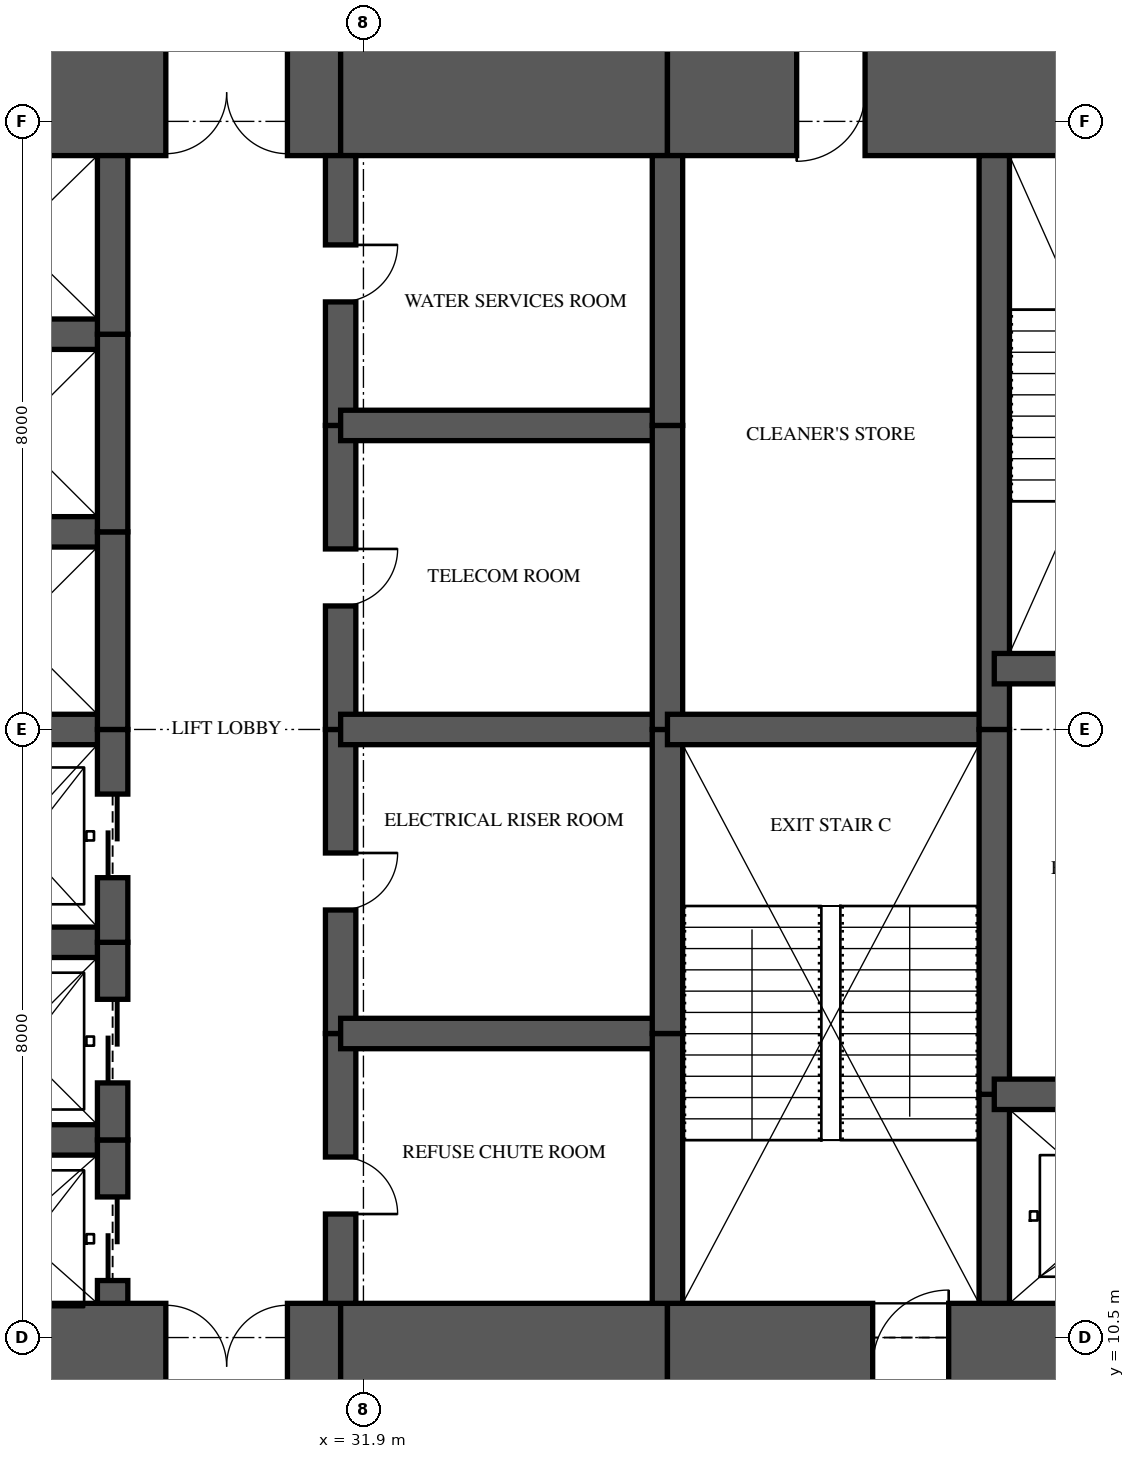
"""IFC4 building model, lengths in metres.
Left out: names, types, materials, properties, quantities, classifications, styles, units other than length and angle.
Written with IfcOpenShell. Run it as: python <this file> out.ifc"""

import sys

from ifc_helpers import new_model, si_unit, direction, frame, frame_2d, origin, place, context, subcontext, project, spatial, rectangle, extrude, element, fill, save


model = new_model("IFC4")
c1 = context("Model", 3, precision=1e-05, world=origin(), true_north=direction((0.0, 1.0)))
c2 = subcontext(c1, "Body", "Model", "MODEL_VIEW")
j1 = project(units=[si_unit("LENGTHUNIT", "METRE"), si_unit("PLANEANGLEUNIT", "RADIAN")], contexts=[c1])
p1 = place(None, origin())
s1 = spatial("IfcSite", under=j1, at=p1, CompositionType="ELEMENT")
p2 = place(p1, origin())
s2 = spatial("IfcBuilding", under=s1, at=p2, CompositionType="ELEMENT")
p3 = place(p2, frame((0.0, 0.0, 41.1)))
s3 = spatial("IfcBuildingStorey", under=s2, at=p3, CompositionType="ELEMENT", Elevation=41.1)
p4 = place(p3, frame((26.0, 10.125, 0.0), z_axis=(0.0, 0.0, 1.0), x_axis=(1.0, 0.0, 0.0)))
e1 = element("IfcWall", 1, at=p4, inside=s3, PredefinedType="SHEAR", context=c2, shape_type="SweptSolid", body=[
    extrude(rectangle(XDim=5.6, YDim=1.65, at=frame_2d((2.8, 0.0))), origin(), (0.0, 0.0, 1.0), 3.35),
])
p5 = place(p4, frame((3.3, 0.0, 0.0)))
e2 = element("IfcOpeningElement", 2, at=p5, cuts=e1, PredefinedType="OPENING", context=c2, shape_type="SweptSolid", body=[
    extrude(rectangle(XDim=1.6, YDim=2.1, at=frame_2d((0.8, 1.05))), frame((0.0, 0.835, 0.0), z_axis=(0.0, -1.0, 0.0), x_axis=(1.0, 0.0, 0.0)), (0.0, 0.0, 1.0), 1.67),
])
p6 = place(p3, frame((31.6, 10.125, 0.0), z_axis=(0.0, 0.0, 1.0), x_axis=(1.0, 0.0, 0.0)))
e3 = element("IfcWall", 3, at=p6, inside=s3, PredefinedType="SHEAR", context=c2, shape_type="SweptSolid", body=[
    extrude(rectangle(XDim=4.3, YDim=1.65, at=frame_2d((2.15, 0.0))), origin(), (0.0, 0.0, 1.0), 3.35),
])
p7 = place(p3, frame((35.9, 10.125, 0.0), z_axis=(0.0, 0.0, 1.0), x_axis=(1.0, 0.0, 0.0)))
e4 = element("IfcWall", 4, at=p7, inside=s3, PredefinedType="SHEAR", context=c2, shape_type="SweptSolid", body=[
    extrude(rectangle(XDim=8.375, YDim=1.65, at=frame_2d((4.188, 0.0))), origin(), (0.0, 0.0, 1.0), 3.35),
])
p8 = place(p7, frame((2.7, 0.0, 0.0)))
e5 = element("IfcOpeningElement", 5, at=p8, cuts=e4, PredefinedType="OPENING", context=c2, shape_type="SweptSolid", body=[
    extrude(rectangle(XDim=1.0, YDim=2.1, at=frame_2d((0.5, 1.05))), frame((0.0, 0.835, 0.0), z_axis=(0.0, -1.0, 0.0), x_axis=(1.0, 0.0, 0.0)), (0.0, 0.0, 1.0), 1.67),
])
p9 = place(p3, frame((44.275, 26.875, 0.0), z_axis=(0.0, 0.0, 1.0), x_axis=(-1.0, 0.0, 0.0)))
e6 = element("IfcWall", 6, at=p9, inside=s3, PredefinedType="SHEAR", context=c2, shape_type="SweptSolid", body=[
    extrude(rectangle(XDim=8.375, YDim=1.65, at=frame_2d((4.188, 0.0))), origin(), (0.0, 0.0, 1.0), 3.35),
])
p10 = place(p9, frame((5.775, 0.0, 0.0)))
e7 = element("IfcOpeningElement", 7, at=p10, cuts=e6, PredefinedType="OPENING", context=c2, shape_type="SweptSolid", body=[
    extrude(rectangle(XDim=0.9, YDim=2.1, at=frame_2d((0.45, 1.05))), frame((0.0, 0.835, 0.0), z_axis=(0.0, -1.0, 0.0), x_axis=(1.0, 0.0, 0.0)), (0.0, 0.0, 1.0), 1.67),
])
p11 = place(p3, frame((35.9, 26.875, 0.0), z_axis=(0.0, 0.0, 1.0), x_axis=(-1.0, 0.0, 0.0)))
e8 = element("IfcWall", 8, at=p11, inside=s3, PredefinedType="SHEAR", context=c2, shape_type="SweptSolid", body=[
    extrude(rectangle(XDim=4.3, YDim=1.65, at=frame_2d((2.15, 0.0))), origin(), (0.0, 0.0, 1.0), 3.35),
])
p12 = place(p3, frame((31.6, 26.875, 0.0), z_axis=(0.0, 0.0, 1.0), x_axis=(-1.0, 0.0, 0.0)))
e9 = element("IfcWall", 9, at=p12, inside=s3, PredefinedType="SHEAR", context=c2, shape_type="SweptSolid", body=[
    extrude(rectangle(XDim=5.6, YDim=1.65, at=frame_2d((2.8, 0.0))), origin(), (0.0, 0.0, 1.0), 3.35),
])
p13 = place(p12, frame((0.7, 0.0, 0.0)))
e10 = element("IfcOpeningElement", 10, at=p13, cuts=e9, PredefinedType="OPENING", context=c2, shape_type="SweptSolid", body=[
    extrude(rectangle(XDim=1.6, YDim=2.1, at=frame_2d((0.8, 1.05))), frame((0.0, 0.835, 0.0), z_axis=(0.0, -1.0, 0.0), x_axis=(1.0, 0.0, 0.0)), (0.0, 0.0, 1.0), 1.67),
])
p14 = place(p3, frame((28.6, 10.95, 0.0), z_axis=(0.0, 0.0, 1.0), x_axis=(0.0, 1.0, 0.0)))
e11 = element("IfcWall", 11, at=p14, inside=s3, PredefinedType="SHEAR", context=c2, shape_type="SweptSolid", body=[
    extrude(rectangle(XDim=2.15, YDim=0.4, at=frame_2d((1.075, 0.0))), origin(), (0.0, 0.0, 1.0), 3.35),
])
p15 = place(p14, frame((0.3, 0.0, 0.0)))
e12 = element("IfcOpeningElement", 12, at=p15, cuts=e11, PredefinedType="OPENING", context=c2, shape_type="SweptSolid", body=[
    extrude(rectangle(XDim=1.1, YDim=2.1, at=frame_2d((0.55, 1.05))), frame((0.0, 0.21, 0.0), z_axis=(0.0, -1.0, 0.0), x_axis=(1.0, 0.0, 0.0)), (0.0, 0.0, 1.0), 0.42),
])
p16 = place(p3, frame((28.6, 13.1, 0.0), z_axis=(0.0, 0.0, 1.0), x_axis=(0.0, 1.0, 0.0)))
e13 = element("IfcWall", 13, at=p16, inside=s3, PredefinedType="SHEAR", context=c2, shape_type="SweptSolid", body=[
    extrude(rectangle(XDim=2.6, YDim=0.4, at=frame_2d((1.3, 0.0))), origin(), (0.0, 0.0, 1.0), 3.35),
])
p17 = place(p16, frame((0.75, 0.0, 0.0)))
e14 = element("IfcOpeningElement", 14, at=p17, cuts=e13, PredefinedType="OPENING", context=c2, shape_type="SweptSolid", body=[
    extrude(rectangle(XDim=1.1, YDim=2.1, at=frame_2d((0.55, 1.05))), frame((0.0, 0.21, 0.0), z_axis=(0.0, -1.0, 0.0), x_axis=(1.0, 0.0, 0.0)), (0.0, 0.0, 1.0), 0.42),
])
p18 = place(p3, frame((28.6, 15.7, 0.0), z_axis=(0.0, 0.0, 1.0), x_axis=(0.0, 1.0, 0.0)))
e15 = element("IfcWall", 15, at=p18, inside=s3, PredefinedType="SHEAR", context=c2, shape_type="SweptSolid", body=[
    extrude(rectangle(XDim=2.8, YDim=0.4, at=frame_2d((1.4, 0.0))), origin(), (0.0, 0.0, 1.0), 3.35),
])
p19 = place(p18, frame((0.85, 0.0, 0.0)))
e16 = element("IfcOpeningElement", 16, at=p19, cuts=e15, PredefinedType="OPENING", context=c2, shape_type="SweptSolid", body=[
    extrude(rectangle(XDim=1.1, YDim=2.1, at=frame_2d((0.55, 1.05))), frame((0.0, 0.21, 0.0), z_axis=(0.0, -1.0, 0.0), x_axis=(1.0, 0.0, 0.0)), (0.0, 0.0, 1.0), 0.42),
])
p20 = place(p3, frame((28.6, 18.5, 0.0), z_axis=(0.0, 0.0, 1.0), x_axis=(0.0, 1.0, 0.0)))
e17 = element("IfcWall", 17, at=p20, inside=s3, PredefinedType="SHEAR", context=c2, shape_type="SweptSolid", body=[
    extrude(rectangle(XDim=2.6, YDim=0.4, at=frame_2d((1.3, 0.0))), origin(), (0.0, 0.0, 1.0), 3.35),
])
p21 = place(p3, frame((28.6, 21.1, 0.0), z_axis=(0.0, 0.0, 1.0), x_axis=(0.0, 1.0, 0.0)))
e18 = element("IfcWall", 18, at=p21, inside=s3, PredefinedType="SHEAR", context=c2, shape_type="SweptSolid", body=[
    extrude(rectangle(XDim=2.6, YDim=0.4, at=frame_2d((1.3, 0.0))), origin(), (0.0, 0.0, 1.0), 3.35),
])
p22 = place(p3, frame((28.6, 23.7, 0.0), z_axis=(0.0, 0.0, 1.0), x_axis=(0.0, 1.0, 0.0)))
e19 = element("IfcWall", 19, at=p22, inside=s3, PredefinedType="SHEAR", context=c2, shape_type="SweptSolid", body=[
    extrude(rectangle(XDim=2.35, YDim=0.4, at=frame_2d((1.175, 0.0))), origin(), (0.0, 0.0, 1.0), 3.35),
])
p23 = place(p3, frame((31.6, 10.95, 0.0), z_axis=(0.0, 0.0, 1.0), x_axis=(0.0, 1.0, 0.0)))
e20 = element("IfcWall", 20, at=p23, inside=s3, PredefinedType="SHEAR", context=c2, shape_type="SweptSolid", body=[
    extrude(rectangle(XDim=3.55, YDim=0.4, at=frame_2d((1.775, 0.0))), origin(), (0.0, 0.0, 1.0), 3.35),
])
p24 = place(p23, frame((1.175, 0.0, 0.0)))
e21 = element("IfcOpeningElement", 21, at=p24, cuts=e20, PredefinedType="OPENING", context=c2, shape_type="SweptSolid", body=[
    extrude(rectangle(XDim=0.75, YDim=2.1, at=frame_2d((0.375, 1.05))), frame((0.0, 0.21, 0.0), z_axis=(0.0, -1.0, 0.0), x_axis=(1.0, 0.0, 0.0)), (0.0, 0.0, 1.0), 0.42),
])
p25 = place(p3, frame((31.6, 14.5, 0.0), z_axis=(0.0, 0.0, 1.0), x_axis=(0.0, 1.0, 0.0)))
e22 = element("IfcWall", 22, at=p25, inside=s3, PredefinedType="SHEAR", context=c2, shape_type="SweptSolid", body=[
    extrude(rectangle(XDim=4.0, YDim=0.4, at=frame_2d((2.0, 0.0))), origin(), (0.0, 0.0, 1.0), 3.35),
])
p26 = place(p25, frame((1.625, 0.0, 0.0)))
e23 = element("IfcOpeningElement", 23, at=p26, cuts=e22, PredefinedType="OPENING", context=c2, shape_type="SweptSolid", body=[
    extrude(rectangle(XDim=0.75, YDim=2.1, at=frame_2d((0.375, 1.05))), frame((0.0, 0.21, 0.0), z_axis=(0.0, -1.0, 0.0), x_axis=(1.0, 0.0, 0.0)), (0.0, 0.0, 1.0), 0.42),
])
p27 = place(p3, frame((31.6, 18.5, 0.0), z_axis=(0.0, 0.0, 1.0), x_axis=(0.0, 1.0, 0.0)))
e24 = element("IfcWall", 24, at=p27, inside=s3, PredefinedType="SHEAR", context=c2, shape_type="SweptSolid", body=[
    extrude(rectangle(XDim=4.0, YDim=0.4, at=frame_2d((2.0, 0.0))), origin(), (0.0, 0.0, 1.0), 3.35),
])
p28 = place(p27, frame((1.625, 0.0, 0.0)))
e25 = element("IfcOpeningElement", 25, at=p28, cuts=e24, PredefinedType="OPENING", context=c2, shape_type="SweptSolid", body=[
    extrude(rectangle(XDim=0.75, YDim=2.1, at=frame_2d((0.375, 1.05))), frame((0.0, 0.21, 0.0), z_axis=(0.0, -1.0, 0.0), x_axis=(1.0, 0.0, 0.0)), (0.0, 0.0, 1.0), 0.42),
])
p29 = place(p3, frame((31.6, 22.5, 0.0), z_axis=(0.0, 0.0, 1.0), x_axis=(0.0, 1.0, 0.0)))
e26 = element("IfcWall", 26, at=p29, inside=s3, PredefinedType="SHEAR", context=c2, shape_type="SweptSolid", body=[
    extrude(rectangle(XDim=3.55, YDim=0.4, at=frame_2d((1.775, 0.0))), origin(), (0.0, 0.0, 1.0), 3.35),
])
p30 = place(p29, frame((1.625, 0.0, 0.0)))
e27 = element("IfcOpeningElement", 27, at=p30, cuts=e26, PredefinedType="OPENING", context=c2, shape_type="SweptSolid", body=[
    extrude(rectangle(XDim=0.75, YDim=2.1, at=frame_2d((0.375, 1.05))), frame((0.0, 0.21, 0.0), z_axis=(0.0, -1.0, 0.0), x_axis=(1.0, 0.0, 0.0)), (0.0, 0.0, 1.0), 0.42),
])
p31 = place(p3, frame((35.9, 10.95, 0.0), z_axis=(0.0, 0.0, 1.0), x_axis=(0.0, 1.0, 0.0)))
e28 = element("IfcWall", 28, at=p31, inside=s3, PredefinedType="SHEAR", context=c2, shape_type="SweptSolid", body=[
    extrude(rectangle(XDim=3.55, YDim=0.4, at=frame_2d((1.775, 0.0))), origin(), (0.0, 0.0, 1.0), 3.35),
])
for number, where, z_axis, x_axis in (
    (29, (35.9, 14.5, 0.0), (0.0, 0.0, 1.0), (0.0, 1.0, 0.0)),
    (30, (35.9, 18.5, 0.0), (0.0, 0.0, 1.0), (0.0, 1.0, 0.0)),
):
    element("IfcWall", number, at=place(p3, frame(where, z_axis=z_axis, x_axis=x_axis)), inside=s3, PredefinedType="SHEAR", context=c2, shape_type="SweptSolid", body=[
        extrude(rectangle(XDim=4.0, YDim=0.4, at=frame_2d((2.0, 0.0))), origin(), (0.0, 0.0, 1.0), 3.35),
    ])
p32 = place(p3, frame((35.9, 22.5, 0.0), z_axis=(0.0, 0.0, 1.0), x_axis=(0.0, 1.0, 0.0)))
e31 = element("IfcWall", 31, at=p32, inside=s3, PredefinedType="SHEAR", context=c2, shape_type="SweptSolid", body=[
    extrude(rectangle(XDim=3.55, YDim=0.4, at=frame_2d((1.775, 0.0))), origin(), (0.0, 0.0, 1.0), 3.35),
])
p33 = place(p3, frame((40.2, 10.95, 0.0), z_axis=(0.0, 0.0, 1.0), x_axis=(0.0, 1.0, 0.0)))
e32 = element("IfcWall", 32, at=p33, inside=s3, PredefinedType="SHEAR", context=c2, shape_type="SweptSolid", body=[
    extrude(rectangle(XDim=2.75, YDim=0.4, at=frame_2d((1.375, 0.0))), origin(), (0.0, 0.0, 1.0), 3.35),
])
p34 = place(p3, frame((40.2, 13.7, 0.0), z_axis=(0.0, 0.0, 1.0), x_axis=(0.0, 1.0, 0.0)))
e33 = element("IfcWall", 33, at=p34, inside=s3, PredefinedType="SHEAR", context=c2, shape_type="SweptSolid", body=[
    extrude(rectangle(XDim=4.8, YDim=0.4, at=frame_2d((2.4, 0.0))), origin(), (0.0, 0.0, 1.0), 3.35),
])
p35 = place(p3, frame((40.2, 18.5, 0.0), z_axis=(0.0, 0.0, 1.0), x_axis=(0.0, 1.0, 0.0)))
e34 = element("IfcWall", 34, at=p35, inside=s3, PredefinedType="SHEAR", context=c2, shape_type="SweptSolid", body=[
    extrude(rectangle(XDim=7.55, YDim=0.4, at=frame_2d((3.775, 0.0))), origin(), (0.0, 0.0, 1.0), 3.35),
])
for number, where, z_axis, x_axis in (
    (35, (26.0, 13.1, 0.0), (0.0, 0.0, 1.0), (1.0, 0.0, 0.0)),
    (36, (26.0, 15.7, 0.0), (0.0, 0.0, 1.0), (1.0, 0.0, 0.0)),
    (37, (26.0, 18.5, 0.0), (0.0, 0.0, 1.0), (1.0, 0.0, 0.0)),
    (38, (26.0, 21.1, 0.0), (0.0, 0.0, 1.0), (1.0, 0.0, 0.0)),
    (39, (26.0, 23.7, 0.0), (0.0, 0.0, 1.0), (1.0, 0.0, 0.0)),
):
    element("IfcWall", number, at=place(p3, frame(where, z_axis=z_axis, x_axis=x_axis)), inside=s3, PredefinedType="SHEAR", context=c2, shape_type="SweptSolid", body=[
        extrude(rectangle(XDim=2.6, YDim=0.4, at=frame_2d((1.3, 0.0))), origin(), (0.0, 0.0, 1.0), 3.35),
    ])
for number, where, z_axis, x_axis in (
    (40, (31.6, 14.5, 0.0), (0.0, 0.0, 1.0), (1.0, 0.0, 0.0)),
    (41, (31.6, 18.5, 0.0), (0.0, 0.0, 1.0), (1.0, 0.0, 0.0)),
    (42, (31.6, 22.5, 0.0), (0.0, 0.0, 1.0), (1.0, 0.0, 0.0)),
):
    element("IfcWall", number, at=place(p3, frame(where, z_axis=z_axis, x_axis=x_axis)), inside=s3, PredefinedType="SHEAR", context=c2, shape_type="SweptSolid", body=[
        extrude(rectangle(XDim=4.3, YDim=0.4, at=frame_2d((2.15, 0.0))), origin(), (0.0, 0.0, 1.0), 3.35),
    ])
p36 = place(p3, frame((35.9, 18.5, 0.0), z_axis=(0.0, 0.0, 1.0), x_axis=(1.0, 0.0, 0.0)))
e43 = element("IfcWall", 43, at=p36, inside=s3, PredefinedType="SHEAR", context=c2, shape_type="SweptSolid", body=[
    extrude(rectangle(XDim=4.3, YDim=0.4, at=frame_2d((2.15, 0.0))), origin(), (0.0, 0.0, 1.0), 3.35),
])
p37 = place(p3, frame((40.2, 13.7, 0.0), z_axis=(0.0, 0.0, 1.0), x_axis=(1.0, 0.0, 0.0)))
e44 = element("IfcWall", 44, at=p37, inside=s3, PredefinedType="SHEAR", context=c2, shape_type="SweptSolid", body=[
    extrude(rectangle(XDim=3.6, YDim=0.4, at=frame_2d((1.8, 0.0))), origin(), (0.0, 0.0, 1.0), 3.35),
])
p38 = place(p37, frame((1.2, 0.0, 0.0)))
e45 = element("IfcOpeningElement", 45, at=p38, cuts=e44, PredefinedType="OPENING", context=c2, shape_type="SweptSolid", body=[
    extrude(rectangle(XDim=1.2, YDim=2.1, at=frame_2d((0.6, 1.05))), frame((0.0, 0.21, 0.0), z_axis=(0.0, -1.0, 0.0), x_axis=(1.0, 0.0, 0.0)), (0.0, 0.0, 1.0), 0.42),
])
p39 = place(p3, frame((40.2, 19.3, 0.0), z_axis=(0.0, 0.0, 1.0), x_axis=(1.0, 0.0, 0.0)))
e46 = element("IfcWall", 46, at=p39, inside=s3, PredefinedType="SHEAR", context=c2, shape_type="SweptSolid", body=[
    extrude(rectangle(XDim=3.6, YDim=0.4, at=frame_2d((1.8, 0.0))), origin(), (0.0, 0.0, 1.0), 3.35),
])
p40 = place(p39, frame((1.3, 0.0, 0.0)))
e47 = element("IfcOpeningElement", 47, at=p40, cuts=e46, PredefinedType="OPENING", context=c2, shape_type="SweptSolid", body=[
    extrude(rectangle(XDim=1.0, YDim=2.1, at=frame_2d((0.5, 1.05))), frame((0.0, 0.21, 0.0), z_axis=(0.0, -1.0, 0.0), x_axis=(1.0, 0.0, 0.0)), (0.0, 0.0, 1.0), 0.42),
])
p41 = place(p15, origin())
e48 = element("IfcDoor", 48, at=p41, inside=s3, OperationType="SLIDING_TO_LEFT", PredefinedType="DOOR", context=c2, shape_type="SweptSolid", body=[
    extrude(rectangle(XDim=1.1, YDim=2.1, at=frame_2d((0.55, 1.05))), frame((0.0, 0.025, 0.0), z_axis=(0.0, -1.0, 0.0), x_axis=(1.0, 0.0, 0.0)), (0.0, 0.0, 1.0), 0.05),
])
fill(e12, e48)
p42 = place(p17, origin())
e49 = element("IfcDoor", 49, at=p42, inside=s3, OperationType="SLIDING_TO_LEFT", PredefinedType="DOOR", context=c2, shape_type="SweptSolid", body=[
    extrude(rectangle(XDim=1.1, YDim=2.1, at=frame_2d((0.55, 1.05))), frame((0.0, 0.025, 0.0), z_axis=(0.0, -1.0, 0.0), x_axis=(1.0, 0.0, 0.0)), (0.0, 0.0, 1.0), 0.05),
])
fill(e14, e49)
p43 = place(p19, origin())
e50 = element("IfcDoor", 50, at=p43, inside=s3, OperationType="SLIDING_TO_LEFT", PredefinedType="DOOR", context=c2, shape_type="SweptSolid", body=[
    extrude(rectangle(XDim=1.1, YDim=2.1, at=frame_2d((0.55, 1.05))), frame((0.0, 0.025, 0.0), z_axis=(0.0, -1.0, 0.0), x_axis=(1.0, 0.0, 0.0)), (0.0, 0.0, 1.0), 0.05),
])
fill(e16, e50)
p44 = place(p5, origin())
e51 = element("IfcDoor", 51, at=p44, inside=s3, OperationType="DOUBLE_DOOR_SINGLE_SWING", PredefinedType="DOOR", context=c2, shape_type="SweptSolid", body=[
    extrude(rectangle(XDim=1.6, YDim=2.1, at=frame_2d((0.8, 1.05))), frame((0.0, 0.025, 0.0), z_axis=(0.0, -1.0, 0.0), x_axis=(1.0, 0.0, 0.0)), (0.0, 0.0, 1.0), 0.05),
])
fill(e2, e51)
p45 = place(p13, origin())
e52 = element("IfcDoor", 52, at=p45, inside=s3, OperationType="DOUBLE_DOOR_SINGLE_SWING", PredefinedType="DOOR", context=c2, shape_type="SweptSolid", body=[
    extrude(rectangle(XDim=1.6, YDim=2.1, at=frame_2d((0.8, 1.05))), frame((0.0, 0.025, 0.0), z_axis=(0.0, -1.0, 0.0), x_axis=(1.0, 0.0, 0.0)), (0.0, 0.0, 1.0), 0.05),
])
fill(e10, e52)
p46 = place(p24, frame((0.75, 0.0, 0.0), z_axis=(0.0, 0.0, 1.0), x_axis=(-1.0, 0.0, 0.0)))
e53 = element("IfcDoor", 53, at=p46, inside=s3, OperationType="SINGLE_SWING_RIGHT", PredefinedType="DOOR", context=c2, shape_type="SweptSolid", body=[
    extrude(rectangle(XDim=0.75, YDim=2.1, at=frame_2d((0.375, 1.05))), frame((0.0, 0.025, 0.0), z_axis=(0.0, -1.0, 0.0), x_axis=(1.0, 0.0, 0.0)), (0.0, 0.0, 1.0), 0.05),
])
fill(e21, e53)
p47 = place(p26, frame((0.75, 0.0, 0.0), z_axis=(0.0, 0.0, 1.0), x_axis=(-1.0, 0.0, 0.0)))
e54 = element("IfcDoor", 54, at=p47, inside=s3, OperationType="SINGLE_SWING_LEFT", PredefinedType="DOOR", context=c2, shape_type="SweptSolid", body=[
    extrude(rectangle(XDim=0.75, YDim=2.1, at=frame_2d((0.375, 1.05))), frame((0.0, 0.025, 0.0), z_axis=(0.0, -1.0, 0.0), x_axis=(1.0, 0.0, 0.0)), (0.0, 0.0, 1.0), 0.05),
])
fill(e23, e54)
p48 = place(p28, frame((0.75, 0.0, 0.0), z_axis=(0.0, 0.0, 1.0), x_axis=(-1.0, 0.0, 0.0)))
e55 = element("IfcDoor", 55, at=p48, inside=s3, OperationType="SINGLE_SWING_LEFT", PredefinedType="DOOR", context=c2, shape_type="SweptSolid", body=[
    extrude(rectangle(XDim=0.75, YDim=2.1, at=frame_2d((0.375, 1.05))), frame((0.0, 0.025, 0.0), z_axis=(0.0, -1.0, 0.0), x_axis=(1.0, 0.0, 0.0)), (0.0, 0.0, 1.0), 0.05),
])
fill(e25, e55)
p49 = place(p30, frame((0.75, 0.0, 0.0), z_axis=(0.0, 0.0, 1.0), x_axis=(-1.0, 0.0, 0.0)))
e56 = element("IfcDoor", 56, at=p49, inside=s3, OperationType="SINGLE_SWING_LEFT", PredefinedType="DOOR", context=c2, shape_type="SweptSolid", body=[
    extrude(rectangle(XDim=0.75, YDim=2.1, at=frame_2d((0.375, 1.05))), frame((0.0, 0.025, 0.0), z_axis=(0.0, -1.0, 0.0), x_axis=(1.0, 0.0, 0.0)), (0.0, 0.0, 1.0), 0.05),
])
fill(e27, e56)
p50 = place(p8, origin())
e57 = element("IfcDoor", 57, at=p50, inside=s3, OperationType="SINGLE_SWING_RIGHT", PredefinedType="DOOR", context=c2, shape_type="SweptSolid", body=[
    extrude(rectangle(XDim=1.0, YDim=2.1, at=frame_2d((0.5, 1.05))), frame((0.0, 0.025, 0.0), z_axis=(0.0, -1.0, 0.0), x_axis=(1.0, 0.0, 0.0)), (0.0, 0.0, 1.0), 0.05),
])
fill(e5, e57)
p51 = place(p10, origin())
e58 = element("IfcDoor", 58, at=p51, inside=s3, OperationType="SINGLE_SWING_RIGHT", PredefinedType="DOOR", context=c2, shape_type="SweptSolid", body=[
    extrude(rectangle(XDim=0.9, YDim=2.1, at=frame_2d((0.45, 1.05))), frame((0.0, 0.47, 0.0), z_axis=(0.0, -1.0, 0.0), x_axis=(1.0, 0.0, 0.0)), (0.0, 0.0, 1.0), 0.8),
])
fill(e7, e58)
save(model, sys.argv[1])
